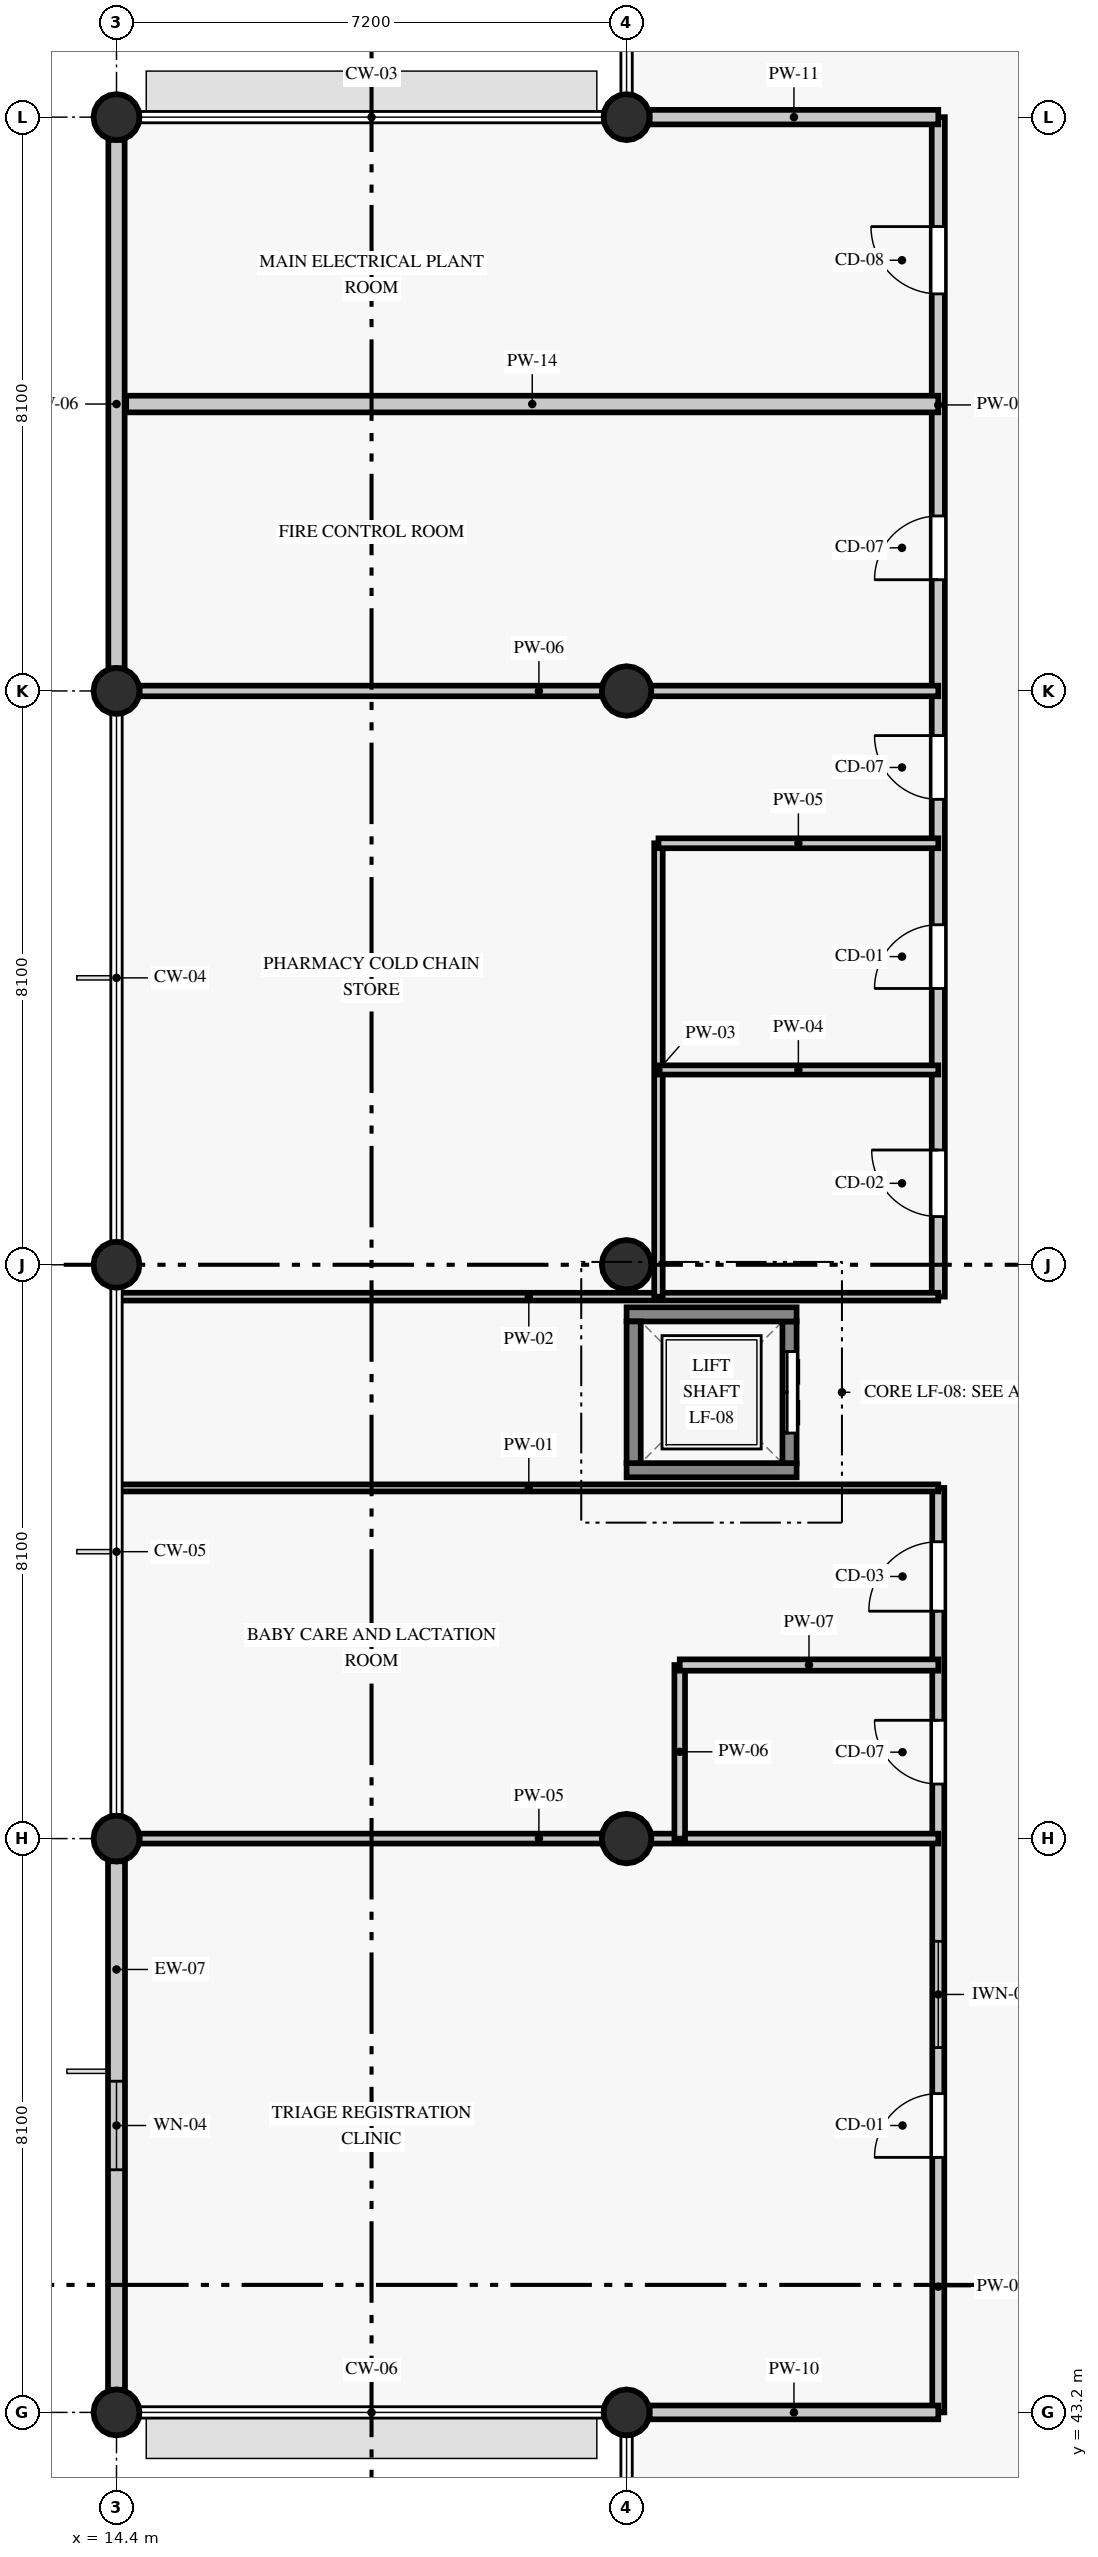
"""IFC4 building model, lengths in metres.
Left out: names, types, materials, properties, quantities, classifications, styles, units other than length and angle.
Written with IfcOpenShell. Run it as: python <this file> out.ifc"""

import sys

from ifc_helpers import new_model, si_unit, direction, frame, frame_2d, origin, origin_2d, place, context, subcontext, project, spatial, rectangle, circle, extrude, element, fill, save


model = new_model("IFC4")
c1 = context("Model", 3, precision=1e-05, world=origin(), true_north=direction((0.0, 1.0)))
c2 = subcontext(c1, "Body", "Model", "MODEL_VIEW")
j1 = project(units=[si_unit("LENGTHUNIT", "METRE"), si_unit("PLANEANGLEUNIT", "RADIAN")], contexts=[c1])
p1 = place(None, origin())
s1 = spatial("IfcSite", under=j1, at=p1, CompositionType="ELEMENT")
p2 = place(p1, origin())
s2 = spatial("IfcBuilding", under=s1, at=p2, CompositionType="ELEMENT")
p3 = place(p2, origin())
s3 = spatial("IfcBuildingStorey", under=s2, at=p3, CompositionType="ELEMENT", Elevation=0.0)
for number, where, z_axis, x_axis in (
    (1, (14.4, 43.2, 0.0), (0.0, 0.0, 1.0), (1.0, 0.0, 0.0)),
    (2, (14.4, 51.3, 0.0), (0.0, 0.0, 1.0), (1.0, 0.0, 0.0)),
    (3, (14.4, 59.4, 0.0), (0.0, 0.0, 1.0), (1.0, 0.0, 0.0)),
    (4, (14.4, 67.5, 0.0), (0.0, 0.0, 1.0), (1.0, 0.0, 0.0)),
    (5, (14.4, 75.6, 0.0), (0.0, 0.0, 1.0), (1.0, 0.0, 0.0)),
):
    element("IfcColumn", number, at=place(p3, frame(where, z_axis=z_axis, x_axis=x_axis)), inside=s3, PredefinedType="COLUMN", context=c2, shape_type="SweptSolid", body=[
        extrude(circle(Radius=0.325, at=origin_2d()), origin(), (0.0, 0.0, 1.0), 4.59),
    ])
p4 = place(p3, frame((21.6, 43.2, 0.0), z_axis=(0.0, 0.0, 1.0), x_axis=(1.0, 0.0, 0.0)))
e6 = element("IfcColumn", 6, at=p4, inside=s3, PredefinedType="COLUMN", context=c2, shape_type="SweptSolid", body=[
    extrude(circle(Radius=0.325, at=origin_2d()), origin(), (0.0, 0.0, 1.0), 4.565),
])
for number, where, z_axis, x_axis in (
    (7, (21.6, 51.3, 0.0), (0.0, 0.0, 1.0), (1.0, 0.0, 0.0)),
    (8, (21.6, 59.4, 0.0), (0.0, 0.0, 1.0), (1.0, 0.0, 0.0)),
    (9, (21.6, 67.5, 0.0), (0.0, 0.0, 1.0), (1.0, 0.0, 0.0)),
):
    element("IfcColumn", number, at=place(p3, frame(where, z_axis=z_axis, x_axis=x_axis)), inside=s3, PredefinedType="COLUMN", context=c2, shape_type="SweptSolid", body=[
        extrude(circle(Radius=0.35, at=origin_2d()), origin(), (0.0, 0.0, 1.0), 4.565),
    ])
p5 = place(p3, frame((21.6, 75.6, 0.0), z_axis=(0.0, 0.0, 1.0), x_axis=(1.0, 0.0, 0.0)))
e10 = element("IfcColumn", 10, at=p5, inside=s3, PredefinedType="COLUMN", context=c2, shape_type="SweptSolid", body=[
    extrude(circle(Radius=0.325, at=origin_2d()), origin(), (0.0, 0.0, 1.0), 4.565),
])
p6 = place(p3, frame((14.4, 75.28, 0.0), z_axis=(0.0, 0.0, 1.0), x_axis=(0.0, -1.0, 0.0)))
e11 = element("IfcWall", 11, at=p6, inside=s3, PredefinedType="STANDARD", context=c2, shape_type="SweptSolid", body=[
    extrude(rectangle(XDim=7.46, YDim=0.23, at=frame_2d((3.73, 0.0))), origin(), (0.0, 0.0, 1.0), 3.94),
])
p7 = place(p3, frame((14.4, 50.98, 0.0), z_axis=(0.0, 0.0, 1.0), x_axis=(0.0, -1.0, 0.0)))
e12 = element("IfcWall", 12, at=p7, inside=s3, PredefinedType="STANDARD", context=c2, shape_type="SweptSolid", body=[
    extrude(rectangle(XDim=7.46, YDim=0.24, at=frame_2d((3.73, 0.0))), origin(), (0.0, 0.0, 1.0), 3.94),
])
p8 = place(p7, frame((3.105, 0.0, 0.9)))
e13 = element("IfcOpeningElement", 13, at=p8, cuts=e12, PredefinedType="OPENING", context=c2, shape_type="SweptSolid", body=[
    extrude(rectangle(XDim=1.25, YDim=1.3, at=frame_2d((0.625, 0.65))), frame((0.0, 0.13, 0.0), z_axis=(0.0, -1.0, 0.0), x_axis=(1.0, 0.0, 0.0)), (0.0, 0.0, 1.0), 0.26),
])
p9 = place(p3, frame((21.6, 56.5, 0.0), z_axis=(0.0, 0.0, 1.0), x_axis=(1.0, 0.0, 0.0)))
e14 = element("IfcWall", 14, at=p9, inside=s3, PredefinedType="SHEAR", context=c2, shape_type="SweptSolid", body=[
    extrude(rectangle(XDim=2.4, YDim=0.2, at=frame_2d((1.2, 0.0))), origin(), (0.0, 0.0, 1.0), 4.565),
])
p10 = place(p3, frame((23.9, 56.6, 0.0), z_axis=(0.0, 0.0, 1.0), x_axis=(0.0, 1.0, 0.0)))
e15 = element("IfcWall", 15, at=p10, inside=s3, PredefinedType="SHEAR", context=c2, shape_type="SweptSolid", body=[
    extrude(rectangle(XDim=2.0, YDim=0.2, at=frame_2d((1.0, 0.0))), origin(), (0.0, 0.0, 1.0), 4.565),
])
p11 = place(p10, frame((0.425, 0.0, 0.0)))
e16 = element("IfcOpeningElement", 16, at=p11, cuts=e15, PredefinedType="OPENING", context=c2, shape_type="SweptSolid", body=[
    extrude(rectangle(XDim=1.15, YDim=2.15, at=frame_2d((0.575, 1.075))), frame((0.0, 0.11, 0.0), z_axis=(0.0, -1.0, 0.0), x_axis=(1.0, 0.0, 0.0)), (0.0, 0.0, 1.0), 0.22),
])
p12 = place(p3, frame((24.0, 58.7, 0.0), z_axis=(0.0, 0.0, 1.0), x_axis=(-1.0, 0.0, 0.0)))
e17 = element("IfcWall", 17, at=p12, inside=s3, PredefinedType="SHEAR", context=c2, shape_type="SweptSolid", body=[
    extrude(rectangle(XDim=2.4, YDim=0.2, at=frame_2d((1.2, 0.0))), origin(), (0.0, 0.0, 1.0), 4.565),
])
p13 = place(p3, frame((21.7, 58.6, 0.0), z_axis=(0.0, 0.0, 1.0), x_axis=(0.0, -1.0, 0.0)))
e18 = element("IfcWall", 18, at=p13, inside=s3, PredefinedType="SHEAR", context=c2, shape_type="SweptSolid", body=[
    extrude(rectangle(XDim=2.0, YDim=0.2, at=frame_2d((1.0, 0.0))), origin(), (0.0, 0.0, 1.0), 4.565),
])
p14 = place(p3, frame((26.0, 43.2, 0.0), z_axis=(0.0, 0.0, 1.0), x_axis=(0.0, 1.0, 0.0)))
e19 = element("IfcWall", 19, at=p14, inside=s3, PredefinedType="PARTITIONING", context=c2, shape_type="SweptSolid", body=[
    extrude(rectangle(XDim=13.05, YDim=0.17, at=frame_2d((6.525, 0.0))), origin(), (0.0, 0.0, 1.0), 3.815),
])
p15 = place(p14, frame((3.6, 0.0, 0.0)))
e20 = element("IfcOpeningElement", 20, at=p15, cuts=e19, PredefinedType="OPENING", context=c2, shape_type="SweptSolid", body=[
    extrude(rectangle(XDim=0.9, YDim=2.08, at=frame_2d((0.45, 1.04))), frame((0.0, 0.095, 0.0), z_axis=(0.0, -1.0, 0.0), x_axis=(1.0, 0.0, 0.0)), (0.0, 0.0, 1.0), 0.19),
])
p16 = place(p14, frame((5.15, 0.0, 1.05)))
e21 = element("IfcOpeningElement", 21, at=p16, cuts=e19, PredefinedType="OPENING", context=c2, shape_type="SweptSolid", body=[
    extrude(rectangle(XDim=1.5, YDim=1.1, at=frame_2d((0.75, 0.55))), frame((0.0, 0.095, 0.0), z_axis=(0.0, -1.0, 0.0), x_axis=(1.0, 0.0, 0.0)), (0.0, 0.0, 1.0), 0.19),
])
p17 = place(p14, frame((8.87, 0.0, 0.0)))
e22 = element("IfcOpeningElement", 22, at=p17, cuts=e19, PredefinedType="OPENING", context=c2, shape_type="SweptSolid", body=[
    extrude(rectangle(XDim=0.9, YDim=2.13, at=frame_2d((0.45, 1.065))), frame((0.0, 0.095, 0.0), z_axis=(0.0, -1.0, 0.0), x_axis=(1.0, 0.0, 0.0)), (0.0, 0.0, 1.0), 0.19),
])
p18 = place(p14, frame((11.31, 0.0, 0.0)))
e23 = element("IfcOpeningElement", 23, at=p18, cuts=e19, PredefinedType="OPENING", context=c2, shape_type="SweptSolid", body=[
    extrude(rectangle(XDim=0.98, YDim=2.08, at=frame_2d((0.49, 1.04))), frame((0.0, 0.095, 0.0), z_axis=(0.0, -1.0, 0.0), x_axis=(1.0, 0.0, 0.0)), (0.0, 0.0, 1.0), 0.19),
])
p19 = place(p3, frame((26.0, 58.95, 0.0), z_axis=(0.0, 0.0, 1.0), x_axis=(0.0, 1.0, 0.0)))
e24 = element("IfcWall", 24, at=p19, inside=s3, PredefinedType="PARTITIONING", context=c2, shape_type="SweptSolid", body=[
    extrude(rectangle(XDim=16.65, YDim=0.185, at=frame_2d((8.325, 0.0))), origin(), (0.0, 0.0, 1.0), 3.815),
])
p20 = place(p19, frame((1.13, 0.0, 0.0)))
e25 = element("IfcOpeningElement", 25, at=p20, cuts=e24, PredefinedType="OPENING", context=c2, shape_type="SweptSolid", body=[
    extrude(rectangle(XDim=0.94, YDim=2.08, at=frame_2d((0.47, 1.04))), frame((0.0, 0.103, 0.0), z_axis=(0.0, -1.0, 0.0), x_axis=(1.0, 0.0, 0.0)), (0.0, 0.0, 1.0), 0.205),
])
p21 = place(p19, frame((4.35, 0.0, 0.0)))
e26 = element("IfcOpeningElement", 26, at=p21, cuts=e24, PredefinedType="OPENING", context=c2, shape_type="SweptSolid", body=[
    extrude(rectangle(XDim=0.9, YDim=2.08, at=frame_2d((0.45, 1.04))), frame((0.0, 0.103, 0.0), z_axis=(0.0, -1.0, 0.0), x_axis=(1.0, 0.0, 0.0)), (0.0, 0.0, 1.0), 0.205),
])
p22 = place(p19, frame((7.02, 0.0, 0.0)))
e27 = element("IfcOpeningElement", 27, at=p22, cuts=e24, PredefinedType="OPENING", context=c2, shape_type="SweptSolid", body=[
    extrude(rectangle(XDim=0.9, YDim=2.13, at=frame_2d((0.45, 1.065))), frame((0.0, 0.103, 0.0), z_axis=(0.0, -1.0, 0.0), x_axis=(1.0, 0.0, 0.0)), (0.0, 0.0, 1.0), 0.205),
])
p23 = place(p19, frame((10.12, 0.0, 0.0)))
e28 = element("IfcOpeningElement", 28, at=p23, cuts=e24, PredefinedType="OPENING", context=c2, shape_type="SweptSolid", body=[
    extrude(rectangle(XDim=0.9, YDim=2.13, at=frame_2d((0.45, 1.065))), frame((0.0, 0.103, 0.0), z_axis=(0.0, -1.0, 0.0), x_axis=(1.0, 0.0, 0.0)), (0.0, 0.0, 1.0), 0.205),
])
p24 = place(p19, frame((14.155, 0.0, 0.0)))
e29 = element("IfcOpeningElement", 29, at=p24, cuts=e24, PredefinedType="OPENING", context=c2, shape_type="SweptSolid", body=[
    extrude(rectangle(XDim=0.95, YDim=2.13, at=frame_2d((0.475, 1.065))), frame((0.0, 0.103, 0.0), z_axis=(0.0, -1.0, 0.0), x_axis=(1.0, 0.0, 0.0)), (0.0, 0.0, 1.0), 0.205),
])
p25 = place(p3, frame((21.925, 43.2, 0.0), z_axis=(0.0, 0.0, 1.0), x_axis=(1.0, 0.0, 0.0)))
e30 = element("IfcWall", 30, at=p25, inside=s3, PredefinedType="PARTITIONING", context=c2, shape_type="SweptSolid", body=[
    extrude(rectangle(XDim=4.075, YDim=0.195, at=frame_2d((2.038, 0.0))), origin(), (0.0, 0.0, 1.0), 3.815),
])
p26 = place(p3, frame((21.925, 75.6, 0.0), z_axis=(0.0, 0.0, 1.0), x_axis=(1.0, 0.0, 0.0)))
e31 = element("IfcWall", 31, at=p26, inside=s3, PredefinedType="PARTITIONING", context=c2, shape_type="SweptSolid", body=[
    extrude(rectangle(XDim=4.075, YDim=0.205, at=frame_2d((2.038, 0.0))), origin(), (0.0, 0.0, 1.0), 3.815),
])
p27 = place(p3, frame((14.725, 51.3, 0.0), z_axis=(0.0, 0.0, 1.0), x_axis=(1.0, 0.0, 0.0)))
e32 = element("IfcWall", 32, at=p27, inside=s3, PredefinedType="PARTITIONING", context=c2, shape_type="SweptSolid", body=[
    extrude(rectangle(XDim=11.275, YDim=0.14, at=frame_2d((5.637, 0.0))), origin(), (0.0, 0.0, 1.0), 3.815),
])
p28 = place(p3, frame((22.35, 51.3, 0.0), z_axis=(0.0, 0.0, 1.0), x_axis=(0.0, 1.0, 0.0)))
e33 = element("IfcWall", 33, at=p28, inside=s3, PredefinedType="PARTITIONING", context=c2, shape_type="SweptSolid", body=[
    extrude(rectangle(XDim=2.45, YDim=0.15, at=frame_2d((1.225, 0.0))), origin(), (0.0, 0.0, 1.0), 3.815),
])
p29 = place(p3, frame((22.35, 53.75, 0.0), z_axis=(0.0, 0.0, 1.0), x_axis=(1.0, 0.0, 0.0)))
e34 = element("IfcWall", 34, at=p29, inside=s3, PredefinedType="PARTITIONING", context=c2, shape_type="SweptSolid", body=[
    extrude(rectangle(XDim=3.65, YDim=0.16, at=frame_2d((1.825, 0.0))), origin(), (0.0, 0.0, 1.0), 4.565),
])
p30 = place(p3, frame((14.44, 56.25, 0.0), z_axis=(0.0, 0.0, 1.0), x_axis=(1.0, 0.0, 0.0)))
e35 = element("IfcWall", 35, at=p30, inside=s3, PredefinedType="PARTITIONING", context=c2, shape_type="SweptSolid", body=[
    extrude(rectangle(XDim=11.56, YDim=0.1, at=frame_2d((5.78, 0.0))), origin(), (0.0, 0.0, 1.0), 4.14),
])
p31 = place(p3, frame((14.44, 58.95, 0.0), z_axis=(0.0, 0.0, 1.0), x_axis=(1.0, 0.0, 0.0)))
e36 = element("IfcWall", 36, at=p31, inside=s3, PredefinedType="PARTITIONING", context=c2, shape_type="SweptSolid", body=[
    extrude(rectangle(XDim=11.56, YDim=0.11, at=frame_2d((5.78, 0.0))), origin(), (0.0, 0.0, 1.0), 4.14),
])
p32 = place(p3, frame((22.05, 58.95, 0.0), z_axis=(0.0, 0.0, 1.0), x_axis=(0.0, 1.0, 0.0)))
e37 = element("IfcWall", 37, at=p32, inside=s3, PredefinedType="PARTITIONING", context=c2, shape_type="SweptSolid", body=[
    extrude(rectangle(XDim=6.4, YDim=0.12, at=frame_2d((3.2, 0.0))), origin(), (0.0, 0.0, 1.0), 3.815),
])
p33 = place(p3, frame((22.05, 62.15, 0.0), z_axis=(0.0, 0.0, 1.0), x_axis=(1.0, 0.0, 0.0)))
e38 = element("IfcWall", 38, at=p33, inside=s3, PredefinedType="PARTITIONING", context=c2, shape_type="SweptSolid", body=[
    extrude(rectangle(XDim=3.95, YDim=0.13, at=frame_2d((1.975, 0.0))), origin(), (0.0, 0.0, 1.0), 4.565),
])
p34 = place(p3, frame((22.05, 65.35, 0.0), z_axis=(0.0, 0.0, 1.0), x_axis=(1.0, 0.0, 0.0)))
e39 = element("IfcWall", 39, at=p34, inside=s3, PredefinedType="PARTITIONING", context=c2, shape_type="SweptSolid", body=[
    extrude(rectangle(XDim=3.95, YDim=0.14, at=frame_2d((1.975, 0.0))), origin(), (0.0, 0.0, 1.0), 4.565),
])
p35 = place(p3, frame((14.725, 67.5, 0.0), z_axis=(0.0, 0.0, 1.0), x_axis=(1.0, 0.0, 0.0)))
e40 = element("IfcWall", 40, at=p35, inside=s3, PredefinedType="PARTITIONING", context=c2, shape_type="SweptSolid", body=[
    extrude(rectangle(XDim=11.275, YDim=0.15, at=frame_2d((5.637, 0.0))), origin(), (0.0, 0.0, 1.0), 3.815),
])
p36 = place(p3, frame((14.537, 71.55, 0.0), z_axis=(0.0, 0.0, 1.0), x_axis=(1.0, 0.0, 0.0)))
e41 = element("IfcWall", 41, at=p36, inside=s3, PredefinedType="PARTITIONING", context=c2, shape_type="SweptSolid", body=[
    extrude(rectangle(XDim=11.463, YDim=0.235, at=frame_2d((5.731, 0.0))), origin(), (0.0, 0.0, 1.0), 4.14),
])
p37 = place(p8, origin())
e42 = element("IfcWindow", 42, at=p37, inside=s3, PartitioningType="SINGLE_PANEL", PredefinedType="WINDOW", context=c2, shape_type="SweptSolid", body=[
    extrude(rectangle(XDim=1.25, YDim=1.3, at=frame_2d((0.625, 0.65))), frame((0.0, 0.03, 0.0), z_axis=(0.0, -1.0, 0.0), x_axis=(1.0, 0.0, 0.0)), (0.0, 0.0, 1.0), 0.06),
])
fill(e13, e42)
p38 = place(p11, frame((1.15, 0.0, 0.0), z_axis=(0.0, 0.0, 1.0), x_axis=(-1.0, 0.0, 0.0)))
e43 = element("IfcDoor", 43, at=p38, inside=s3, OperationType="DOUBLE_DOOR_SLIDING", PredefinedType="DOOR", context=c2, shape_type="SweptSolid", body=[
    extrude(rectangle(XDim=1.15, YDim=2.15, at=frame_2d((0.575, 1.075))), frame((0.0, 0.025, 0.0), z_axis=(0.0, -1.0, 0.0), x_axis=(1.0, 0.0, 0.0)), (0.0, 0.0, 1.0), 0.05),
])
fill(e16, e43)
p39 = place(p15, origin())
e44 = element("IfcDoor", 44, at=p39, inside=s3, OperationType="SINGLE_SWING_LEFT", PredefinedType="DOOR", context=c2, shape_type="SweptSolid", body=[
    extrude(rectangle(XDim=0.9, YDim=2.08, at=frame_2d((0.45, 1.04))), frame((0.0, 0.025, 0.0), z_axis=(0.0, -1.0, 0.0), x_axis=(1.0, 0.0, 0.0)), (0.0, 0.0, 1.0), 0.05),
])
fill(e20, e44)
p40 = place(p16, origin())
e45 = element("IfcWindow", 45, at=p40, inside=s3, PartitioningType="SINGLE_PANEL", PredefinedType="WINDOW", context=c2, shape_type="SweptSolid", body=[
    extrude(rectangle(XDim=1.5, YDim=1.1, at=frame_2d((0.75, 0.55))), frame((0.0, 0.03, 0.0), z_axis=(0.0, -1.0, 0.0), x_axis=(1.0, 0.0, 0.0)), (0.0, 0.0, 1.0), 0.06),
])
fill(e21, e45)
p41 = place(p17, origin())
e46 = element("IfcDoor", 46, at=p41, inside=s3, OperationType="SINGLE_SWING_RIGHT", PredefinedType="DOOR", context=c2, shape_type="SweptSolid", body=[
    extrude(rectangle(XDim=0.9, YDim=2.13, at=frame_2d((0.45, 1.065))), frame((0.0, 0.025, 0.0), z_axis=(0.0, -1.0, 0.0), x_axis=(1.0, 0.0, 0.0)), (0.0, 0.0, 1.0), 0.05),
])
fill(e22, e46)
p42 = place(p18, origin())
e47 = element("IfcDoor", 47, at=p42, inside=s3, OperationType="SINGLE_SWING_LEFT", PredefinedType="DOOR", context=c2, shape_type="SweptSolid", body=[
    extrude(rectangle(XDim=0.98, YDim=2.08, at=frame_2d((0.49, 1.04))), frame((0.0, 0.025, 0.0), z_axis=(0.0, -1.0, 0.0), x_axis=(1.0, 0.0, 0.0)), (0.0, 0.0, 1.0), 0.05),
])
fill(e23, e47)
p43 = place(p20, origin())
e48 = element("IfcDoor", 48, at=p43, inside=s3, OperationType="SINGLE_SWING_RIGHT", PredefinedType="DOOR", context=c2, shape_type="SweptSolid", body=[
    extrude(rectangle(XDim=0.94, YDim=2.08, at=frame_2d((0.47, 1.04))), frame((0.0, 0.025, 0.0), z_axis=(0.0, -1.0, 0.0), x_axis=(1.0, 0.0, 0.0)), (0.0, 0.0, 1.0), 0.05),
])
fill(e25, e48)
p44 = place(p21, origin())
e49 = element("IfcDoor", 49, at=p44, inside=s3, OperationType="SINGLE_SWING_LEFT", PredefinedType="DOOR", context=c2, shape_type="SweptSolid", body=[
    extrude(rectangle(XDim=0.9, YDim=2.08, at=frame_2d((0.45, 1.04))), frame((0.0, 0.025, 0.0), z_axis=(0.0, -1.0, 0.0), x_axis=(1.0, 0.0, 0.0)), (0.0, 0.0, 1.0), 0.05),
])
fill(e26, e49)
p45 = place(p22, origin())
e50 = element("IfcDoor", 50, at=p45, inside=s3, OperationType="SINGLE_SWING_RIGHT", PredefinedType="DOOR", context=c2, shape_type="SweptSolid", body=[
    extrude(rectangle(XDim=0.9, YDim=2.13, at=frame_2d((0.45, 1.065))), frame((0.0, 0.025, 0.0), z_axis=(0.0, -1.0, 0.0), x_axis=(1.0, 0.0, 0.0)), (0.0, 0.0, 1.0), 0.05),
])
fill(e27, e50)
p46 = place(p23, origin())
e51 = element("IfcDoor", 51, at=p46, inside=s3, OperationType="SINGLE_SWING_LEFT", PredefinedType="DOOR", context=c2, shape_type="SweptSolid", body=[
    extrude(rectangle(XDim=0.9, YDim=2.13, at=frame_2d((0.45, 1.065))), frame((0.0, 0.025, 0.0), z_axis=(0.0, -1.0, 0.0), x_axis=(1.0, 0.0, 0.0)), (0.0, 0.0, 1.0), 0.05),
])
fill(e28, e51)
p47 = place(p24, origin())
e52 = element("IfcDoor", 52, at=p47, inside=s3, OperationType="SINGLE_SWING_RIGHT", PredefinedType="DOOR", context=c2, shape_type="SweptSolid", body=[
    extrude(rectangle(XDim=0.95, YDim=2.13, at=frame_2d((0.475, 1.065))), frame((0.0, 0.025, 0.0), z_axis=(0.0, -1.0, 0.0), x_axis=(1.0, 0.0, 0.0)), (0.0, 0.0, 1.0), 0.05),
])
fill(e29, e52)
save(model, sys.argv[1])
